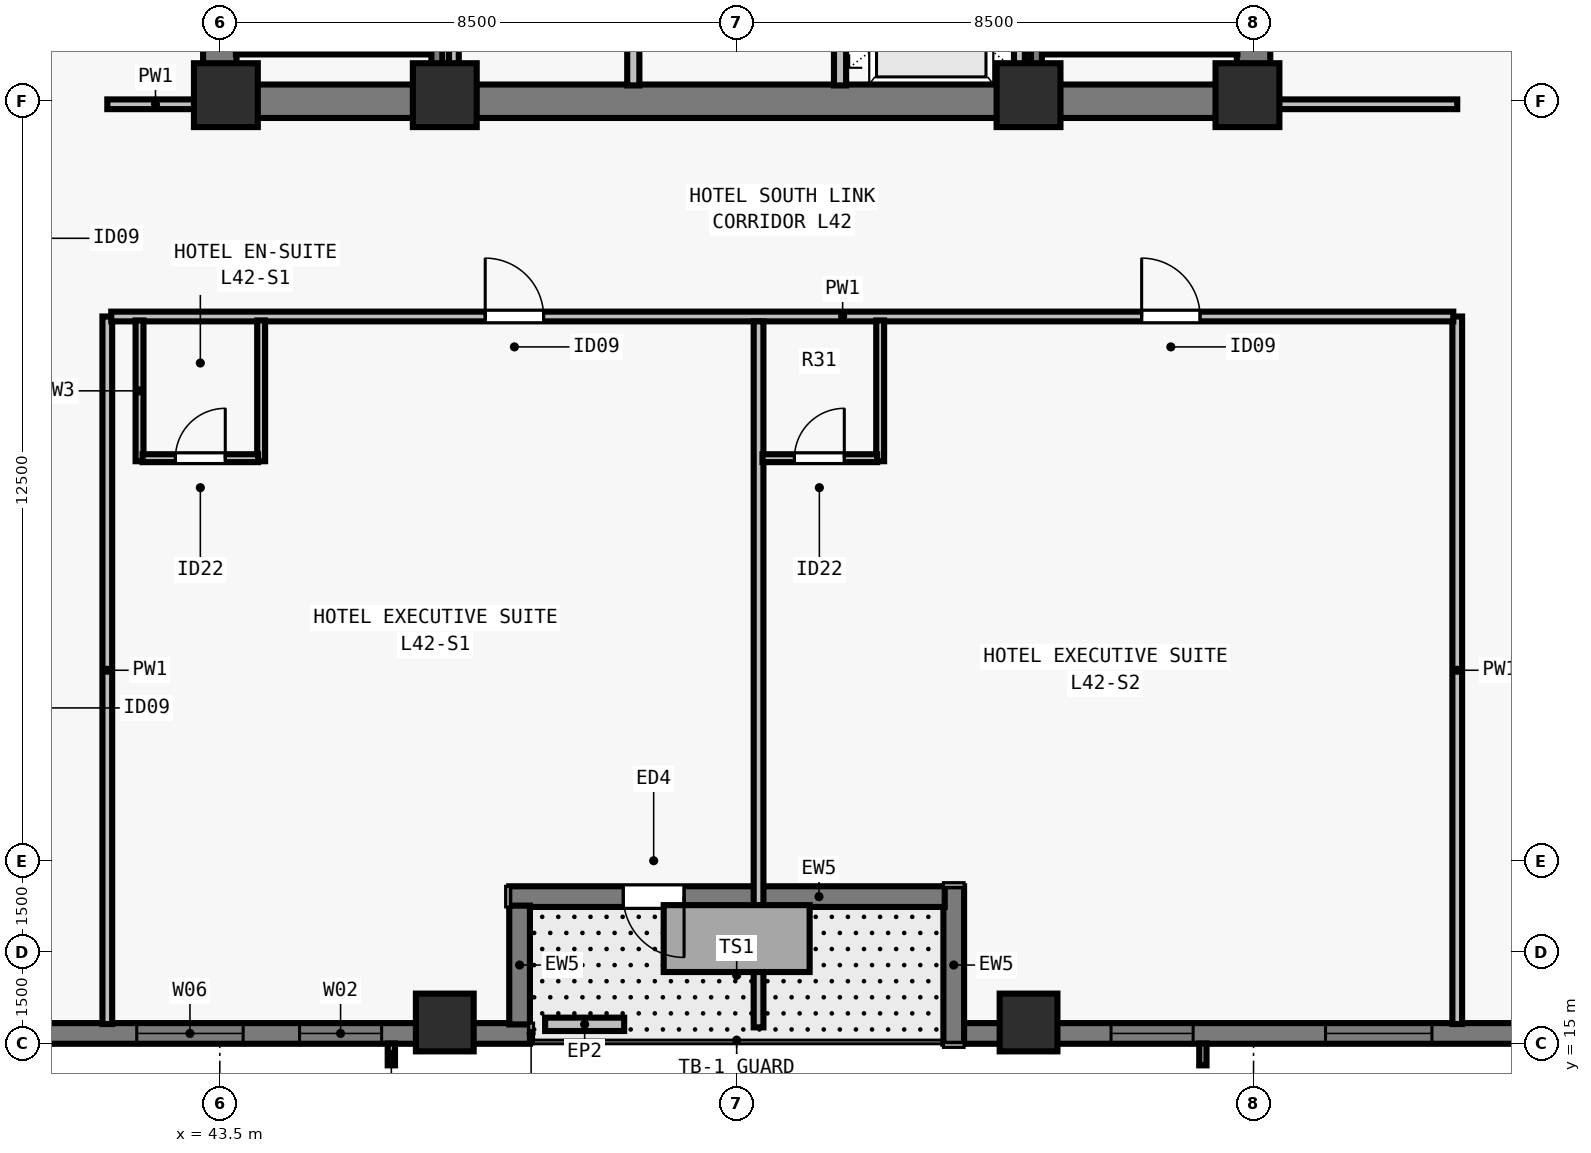
"""IFC4 building model, lengths in metres.
Left out: names, types, materials, properties, quantities, classifications, styles, units other than length and angle.
Written with IfcOpenShell. Run it as: python <this file> out.ifc"""

import sys

from ifc_helpers import new_model, si_unit, direction, frame, frame_2d, origin, origin_2d, place, context, subcontext, project, spatial, rectangle, extrude, element, fill, save


model = new_model("IFC4")
c1 = context("Model", 3, precision=1e-05, world=origin(), true_north=direction((0.0, 1.0)))
c2 = subcontext(c1, "Body", "Model", "MODEL_VIEW")
j1 = project(units=[si_unit("LENGTHUNIT", "METRE"), si_unit("PLANEANGLEUNIT", "RADIAN")], contexts=[c1])
p1 = place(None, origin())
s1 = spatial("IfcSite", under=j1, at=p1, CompositionType="ELEMENT")
p2 = place(p1, origin())
s2 = spatial("IfcBuilding", under=s1, at=p2, CompositionType="ELEMENT")
p3 = place(p2, frame((0.0, 0.0, 155.0)))
s3 = spatial("IfcBuildingStorey", under=s2, at=p3, CompositionType="ELEMENT", Elevation=155.0)
for number, where, z_axis, x_axis in (
    (1, (43.6, 30.6, 0.0), (0.0, 0.0, 1.0), (1.0, 0.0, 0.0)),
    (2, (47.2, 30.6, 0.0), (0.0, 0.0, 1.0), (1.0, 0.0, 0.0)),
    (3, (56.8, 30.6, 0.0), (0.0, 0.0, 1.0), (1.0, 0.0, 0.0)),
    (4, (60.4, 30.6, 0.0), (0.0, 0.0, 1.0), (1.0, 0.0, 0.0)),
):
    element("IfcColumn", number, at=place(p3, frame(where, z_axis=z_axis, x_axis=x_axis)), inside=s3, PredefinedType="COLUMN", context=c2, shape_type="SweptSolid", body=[
        extrude(rectangle(XDim=1.05, YDim=1.05, at=origin_2d()), origin(), (0.0, 0.0, 1.0), 3.5),
    ])
for number, where, z_axis, x_axis in (
    (5, (47.2, 15.35, 0.0), (0.0, 0.0, 1.0), (1.0, 0.0, 0.0)),
    (6, (56.8, 15.35, 0.0), (0.0, 0.0, 1.0), (1.0, 0.0, 0.0)),
):
    element("IfcColumn", number, at=place(p3, frame(where, z_axis=z_axis, x_axis=x_axis)), inside=s3, PredefinedType="COLUMN", context=c2, shape_type="SweptSolid", body=[
        extrude(rectangle(XDim=0.95, YDim=0.95, at=origin_2d()), origin(), (0.0, 0.0, 1.0), 3.5),
    ])
p4 = place(p3, frame((48.6, 15.17, 0.0), z_axis=(0.0, 0.0, 1.0), x_axis=(-1.0, 0.0, 0.0)))
e7 = element("IfcWall", 7, at=p4, inside=s3, PredefinedType="SOLIDWALL", context=c2, shape_type="SweptSolid", body=[
    extrude(rectangle(XDim=16.282, YDim=0.34, at=frame_2d((8.141, 0.0))), origin(), (0.0, 0.0, 1.0), 3.28),
])
p5 = place(p4, frame((2.439, 0.0, 0.8)))
e8 = element("IfcOpeningElement", 8, at=p5, cuts=e7, PredefinedType="OPENING", context=c2, shape_type="SweptSolid", body=[
    extrude(rectangle(XDim=1.35, YDim=1.66, at=frame_2d((0.675, 0.83))), frame((0.0, 0.18, 0.0), z_axis=(0.0, -1.0, 0.0), x_axis=(1.0, 0.0, 0.0)), (0.0, 0.0, 1.0), 0.36),
])
p6 = place(p4, frame((4.716, 0.0, 0.8)))
e9 = element("IfcOpeningElement", 9, at=p6, cuts=e7, PredefinedType="OPENING", context=c2, shape_type="SweptSolid", body=[
    extrude(rectangle(XDim=1.75, YDim=1.66, at=frame_2d((0.875, 0.83))), frame((0.0, 0.18, 0.0), z_axis=(0.0, -1.0, 0.0), x_axis=(1.0, 0.0, 0.0)), (0.0, 0.0, 1.0), 0.36),
])
p7 = place(p4, frame((9.443, 0.0, 0.8)))
e10 = element("IfcOpeningElement", 10, at=p7, cuts=e7, PredefinedType="OPENING", context=c2, shape_type="SweptSolid", body=[
    extrude(rectangle(XDim=1.35, YDim=1.66, at=frame_2d((0.675, 0.83))), frame((0.0, 0.18, 0.0), z_axis=(0.0, -1.0, 0.0), x_axis=(1.0, 0.0, 0.0)), (0.0, 0.0, 1.0), 0.36),
])
p8 = place(p3, frame((72.0, 15.17, 0.0), z_axis=(0.0, 0.0, 1.0), x_axis=(-1.0, 0.0, 0.0)))
e11 = element("IfcWall", 11, at=p8, inside=s3, PredefinedType="SOLIDWALL", context=c2, shape_type="SweptSolid", body=[
    extrude(rectangle(XDim=16.282, YDim=0.34, at=frame_2d((8.141, 0.0))), origin(), (0.0, 0.0, 1.0), 3.28),
])
p9 = place(p8, frame((4.189, 0.0, 0.8)))
e12 = element("IfcOpeningElement", 12, at=p9, cuts=e11, PredefinedType="OPENING", context=c2, shape_type="SweptSolid", body=[
    extrude(rectangle(XDim=1.35, YDim=1.66, at=frame_2d((0.675, 0.83))), frame((0.0, 0.18, 0.0), z_axis=(0.0, -1.0, 0.0), x_axis=(1.0, 0.0, 0.0)), (0.0, 0.0, 1.0), 0.36),
])
p10 = place(p8, frame((8.566, 0.0, 0.8)))
e13 = element("IfcOpeningElement", 13, at=p10, cuts=e11, PredefinedType="OPENING", context=c2, shape_type="SweptSolid", body=[
    extrude(rectangle(XDim=1.75, YDim=1.66, at=frame_2d((0.875, 0.83))), frame((0.0, 0.18, 0.0), z_axis=(0.0, -1.0, 0.0), x_axis=(1.0, 0.0, 0.0)), (0.0, 0.0, 1.0), 0.36),
])
p11 = place(p8, frame((12.493, 0.0, 0.8)))
e14 = element("IfcOpeningElement", 14, at=p11, cuts=e11, PredefinedType="OPENING", context=c2, shape_type="SweptSolid", body=[
    extrude(rectangle(XDim=1.35, YDim=1.66, at=frame_2d((0.675, 0.83))), frame((0.0, 0.18, 0.0), z_axis=(0.0, -1.0, 0.0), x_axis=(1.0, 0.0, 0.0)), (0.0, 0.0, 1.0), 0.36),
])
p12 = place(p3, frame((55.57, 15.0, 0.0), z_axis=(0.0, 0.0, 1.0), x_axis=(0.0, 1.0, 0.0)))
e15 = element("IfcWall", 15, at=p12, inside=s3, PredefinedType="SOLIDWALL", context=c2, shape_type="SweptSolid", body=[
    extrude(rectangle(XDim=2.59, YDim=0.34, at=frame_2d((1.295, 0.0))), origin(), (0.0, 0.0, 1.0), 3.28),
])
p13 = place(p3, frame((55.422, 17.42, 0.0), z_axis=(0.0, 0.0, 1.0), x_axis=(-1.0, 0.0, 0.0)))
e16 = element("IfcWall", 16, at=p13, inside=s3, PredefinedType="SOLIDWALL", context=c2, shape_type="SweptSolid", body=[
    extrude(rectangle(XDim=7.162, YDim=0.34, at=frame_2d((3.581, 0.0))), origin(), (0.0, 0.0, 1.0), 3.28),
])
p14 = place(p13, frame((4.287, 0.0, 0.0)))
e17 = element("IfcOpeningElement", 17, at=p14, cuts=e16, PredefinedType="OPENING", context=c2, shape_type="SweptSolid", body=[
    extrude(rectangle(XDim=1.0, YDim=2.15, at=frame_2d((0.5, 1.075))), frame((0.0, 0.18, 0.0), z_axis=(0.0, -1.0, 0.0), x_axis=(1.0, 0.0, 0.0)), (0.0, 0.0, 1.0), 0.36),
])
p15 = place(p3, frame((48.43, 17.272, 0.0), z_axis=(0.0, 0.0, 1.0), x_axis=(0.0, -1.0, 0.0)))
e18 = element("IfcWall", 18, at=p15, inside=s3, PredefinedType="SOLIDWALL", context=c2, shape_type="SweptSolid", body=[
    extrude(rectangle(XDim=1.954, YDim=0.34, at=frame_2d((0.977, 0.0))), origin(), (0.0, 0.0, 1.0), 3.28),
])
p16 = place(p3, frame((48.85, 15.32, 0.0), z_axis=(0.0, 0.0, 1.0), x_axis=(1.0, 0.0, 0.0)))
e19 = element("IfcWall", 19, at=p16, inside=s3, PredefinedType="PARAPET", context=c2, shape_type="SweptSolid", body=[
    extrude(rectangle(XDim=1.3, YDim=0.22, at=frame_2d((0.65, 0.0))), origin(), (0.0, 0.0, 1.0), 0.55),
])
p17 = place(p3, frame((43.225, 30.5, 0.0), z_axis=(0.0, 0.0, 1.0), x_axis=(1.0, 0.0, 0.0)))
e20 = element("IfcWall", 20, at=p17, inside=s3, PredefinedType="SHEAR", context=c2, shape_type="SweptSolid", body=[
    extrude(rectangle(XDim=17.55, YDim=0.55, at=frame_2d((8.775, 0.0))), origin(), (0.0, 0.0, 1.0), 3.28),
])
for number, where, z_axis, x_axis in (
    (21, (43.5, 30.765, 0.0), (0.0, 0.0, 1.0), (0.0, 1.0, 0.0)),
    (22, (60.5, 30.765, 0.0), (0.0, 0.0, 1.0), (0.0, 1.0, 0.0)),
):
    element("IfcWall", number, at=place(p3, frame(where, z_axis=z_axis, x_axis=x_axis)), inside=s3, PredefinedType="SHEAR", context=c2, shape_type="SweptSolid", body=[
        extrude(rectangle(XDim=7.985, YDim=0.55, at=frame_2d((3.993, 0.0))), origin(), (0.0, 0.0, 1.0), 3.28),
    ])
p18 = place(p3, frame((50.3, 30.76, 0.0), z_axis=(0.0, 0.0, 1.0), x_axis=(0.0, 1.0, 0.0)))
e23 = element("IfcWall", 23, at=p18, inside=s3, PredefinedType="SOLIDWALL", context=c2, shape_type="SweptSolid", body=[
    extrude(rectangle(XDim=7.855, YDim=0.2, at=frame_2d((3.927, 0.0))), origin(), (0.0, 0.0, 1.0), 3.28),
])
p19 = place(p18, frame((3.29, 0.0, 0.0)))
e24 = element("IfcOpeningElement", 24, at=p19, cuts=e23, PredefinedType="OPENING", context=c2, shape_type="SweptSolid", body=[
    extrude(rectangle(XDim=0.9, YDim=2.12, at=frame_2d((0.45, 1.06))), frame((0.0, 0.11, 0.0), z_axis=(0.0, -1.0, 0.0), x_axis=(1.0, 0.0, 0.0)), (0.0, 0.0, 1.0), 0.22),
])
p20 = place(p3, frame((53.7, 30.76, 0.0), z_axis=(0.0, 0.0, 1.0), x_axis=(0.0, 1.0, 0.0)))
e25 = element("IfcWall", 25, at=p20, inside=s3, PredefinedType="SOLIDWALL", context=c2, shape_type="SweptSolid", body=[
    extrude(rectangle(XDim=7.855, YDim=0.2, at=frame_2d((3.927, 0.0))), origin(), (0.0, 0.0, 1.0), 3.28),
])
p21 = place(p20, frame((0.79, 0.0, 0.0)))
e26 = element("IfcOpeningElement", 26, at=p21, cuts=e25, PredefinedType="OPENING", context=c2, shape_type="SweptSolid", body=[
    extrude(rectangle(XDim=1.1, YDim=2.2, at=frame_2d((0.55, 1.1))), frame((0.0, 0.11, 0.0), z_axis=(0.0, -1.0, 0.0), x_axis=(1.0, 0.0, 0.0)), (0.0, 0.0, 1.0), 0.22),
])
p22 = place(p20, frame((3.49, 0.0, 0.0)))
e27 = element("IfcOpeningElement", 27, at=p22, cuts=e25, PredefinedType="OPENING", context=c2, shape_type="SweptSolid", body=[
    extrude(rectangle(XDim=1.1, YDim=2.2, at=frame_2d((0.55, 1.1))), frame((0.0, 0.11, 0.0), z_axis=(0.0, -1.0, 0.0), x_axis=(1.0, 0.0, 0.0)), (0.0, 0.0, 1.0), 0.22),
])
p23 = place(p20, frame((6.19, 0.0, 0.0)))
e28 = element("IfcOpeningElement", 28, at=p23, cuts=e25, PredefinedType="OPENING", context=c2, shape_type="SweptSolid", body=[
    extrude(rectangle(XDim=1.1, YDim=2.2, at=frame_2d((0.55, 1.1))), frame((0.0, 0.11, 0.0), z_axis=(0.0, -1.0, 0.0), x_axis=(1.0, 0.0, 0.0)), (0.0, 0.0, 1.0), 0.22),
])
p24 = place(p3, frame((47.35, 30.76, 0.0), z_axis=(0.0, 0.0, 1.0), x_axis=(0.0, 1.0, 0.0)))
e29 = element("IfcWall", 29, at=p24, inside=s3, PredefinedType="PARTITIONING", context=c2, shape_type="SweptSolid", body=[
    extrude(rectangle(XDim=7.855, YDim=0.16, at=frame_2d((3.927, 0.0))), origin(), (0.0, 0.0, 1.0), 3.28),
])
p25 = place(p3, frame((56.65, 30.76, 0.0), z_axis=(0.0, 0.0, 1.0), x_axis=(0.0, 1.0, 0.0)))
e30 = element("IfcWall", 30, at=p25, inside=s3, PredefinedType="SOLIDWALL", context=c2, shape_type="SweptSolid", body=[
    extrude(rectangle(XDim=7.855, YDim=0.18, at=frame_2d((3.927, 0.0))), origin(), (0.0, 0.0, 1.0), 3.28),
])
p26 = place(p3, frame((41.65, 15.325, 0.0), z_axis=(0.0, 0.0, 1.0), x_axis=(0.0, 1.0, 0.0)))
e31 = element("IfcWall", 31, at=p26, inside=s3, PredefinedType="PARTITIONING", context=c2, shape_type="SweptSolid", body=[
    extrude(rectangle(XDim=11.635, YDim=0.16, at=frame_2d((5.817, 0.0))), origin(), (0.0, 0.0, 1.0), 3.28),
])
p27 = place(p3, frame((41.65, 30.45, 0.0), z_axis=(0.0, 0.0, 1.0), x_axis=(1.0, 0.0, 0.0)))
e32 = element("IfcWall", 32, at=p27, inside=s3, PredefinedType="PARTITIONING", context=c2, shape_type="SweptSolid", body=[
    extrude(rectangle(XDim=1.585, YDim=0.16, at=frame_2d((0.792, 0.0))), origin(), (0.0, 0.0, 1.0), 3.28),
])
p28 = place(p3, frame((63.85, 15.325, 0.0), z_axis=(0.0, 0.0, 1.0), x_axis=(0.0, 1.0, 0.0)))
e33 = element("IfcWall", 33, at=p28, inside=s3, PredefinedType="PARTITIONING", context=c2, shape_type="SweptSolid", body=[
    extrude(rectangle(XDim=11.635, YDim=0.16, at=frame_2d((5.817, 0.0))), origin(), (0.0, 0.0, 1.0), 2.555),
])
p29 = place(p3, frame((60.765, 30.45, 0.0), z_axis=(0.0, 0.0, 1.0), x_axis=(1.0, 0.0, 0.0)))
e34 = element("IfcWall", 34, at=p29, inside=s3, PredefinedType="PARTITIONING", context=c2, shape_type="SweptSolid", body=[
    extrude(rectangle(XDim=3.085, YDim=0.16, at=frame_2d((1.542, 0.0))), origin(), (0.0, 0.0, 1.0), 3.28),
])
p30 = place(p3, frame((41.715, 26.96, 0.0), z_axis=(0.0, 0.0, 1.0), x_axis=(1.0, 0.0, 0.0)))
e35 = element("IfcWall", 35, at=p30, inside=s3, PredefinedType="PARTITIONING", context=c2, shape_type="SweptSolid", body=[
    extrude(rectangle(XDim=22.07, YDim=0.16, at=frame_2d((11.035, 0.0))), origin(), (0.0, 0.0, 1.0), 3.28),
])
p31 = place(p30, frame((6.15, 0.0, 0.0)))
e36 = element("IfcOpeningElement", 36, at=p31, cuts=e35, PredefinedType="OPENING", context=c2, shape_type="SweptSolid", body=[
    extrude(rectangle(XDim=0.96, YDim=2.15, at=frame_2d((0.48, 1.075))), frame((0.0, 0.09, 0.0), z_axis=(0.0, -1.0, 0.0), x_axis=(1.0, 0.0, 0.0)), (0.0, 0.0, 1.0), 0.18),
])
p32 = place(p30, frame((16.945, 0.0, 0.0)))
e37 = element("IfcOpeningElement", 37, at=p32, cuts=e35, PredefinedType="OPENING", context=c2, shape_type="SweptSolid", body=[
    extrude(rectangle(XDim=0.96, YDim=2.15, at=frame_2d((0.48, 1.075))), frame((0.0, 0.09, 0.0), z_axis=(0.0, -1.0, 0.0), x_axis=(1.0, 0.0, 0.0)), (0.0, 0.0, 1.0), 0.18),
])
for number, where, z_axis, x_axis in (
    (38, (42.18, 24.58, 0.0), (0.0, 0.0, 1.0), (0.0, 1.0, 0.0)),
    (39, (44.18, 24.58, 0.0), (0.0, 0.0, 1.0), (0.0, 1.0, 0.0)),
):
    element("IfcWall", number, at=place(p3, frame(where, z_axis=z_axis, x_axis=x_axis)), inside=s3, PredefinedType="PLUMBINGWALL", context=c2, shape_type="SweptSolid", body=[
        extrude(rectangle(XDim=2.315, YDim=0.13, at=frame_2d((1.157, 0.0))), origin(), (0.0, 0.0, 1.0), 3.28),
    ])
p33 = place(p3, frame((42.23, 24.63, 0.0), z_axis=(0.0, 0.0, 1.0), x_axis=(1.0, 0.0, 0.0)))
e40 = element("IfcWall", 40, at=p33, inside=s3, PredefinedType="PLUMBINGWALL", context=c2, shape_type="SweptSolid", body=[
    extrude(rectangle(XDim=1.9, YDim=0.13, at=frame_2d((0.95, 0.0))), origin(), (0.0, 0.0, 1.0), 3.28),
])
p34 = place(p33, frame((0.54, 0.0, 0.0)))
e41 = element("IfcOpeningElement", 41, at=p34, cuts=e40, PredefinedType="OPENING", context=c2, shape_type="SweptSolid", body=[
    extrude(rectangle(XDim=0.82, YDim=2.1, at=frame_2d((0.41, 1.05))), frame((0.0, 0.075, 0.0), z_axis=(0.0, -1.0, 0.0), x_axis=(1.0, 0.0, 0.0)), (0.0, 0.0, 1.0), 0.15),
])
p35 = place(p3, frame((52.36, 15.27, 0.0), z_axis=(0.0, 0.0, 1.0), x_axis=(0.0, 1.0, 0.0)))
e42 = element("IfcWall", 42, at=p35, inside=s3, PredefinedType="PARTITIONING", context=c2, shape_type="SweptSolid", body=[
    extrude(rectangle(XDim=11.61, YDim=0.16, at=frame_2d((5.805, 0.0))), origin(), (0.0, 0.0, 1.0), 2.896),
])
p36 = place(p3, frame((54.36, 24.58, 0.0), z_axis=(0.0, 0.0, 1.0), x_axis=(0.0, 1.0, 0.0)))
e43 = element("IfcWall", 43, at=p36, inside=s3, PredefinedType="PLUMBINGWALL", context=c2, shape_type="SweptSolid", body=[
    extrude(rectangle(XDim=2.315, YDim=0.13, at=frame_2d((1.157, 0.0))), origin(), (0.0, 0.0, 1.0), 2.896),
])
p37 = place(p3, frame((52.425, 24.63, 0.0), z_axis=(0.0, 0.0, 1.0), x_axis=(1.0, 0.0, 0.0)))
e44 = element("IfcWall", 44, at=p37, inside=s3, PredefinedType="PLUMBINGWALL", context=c2, shape_type="SweptSolid", body=[
    extrude(rectangle(XDim=1.885, YDim=0.13, at=frame_2d((0.942, 0.0))), origin(), (0.0, 0.0, 1.0), 3.28),
])
p38 = place(p37, frame((0.525, 0.0, 0.0)))
e45 = element("IfcOpeningElement", 45, at=p38, cuts=e44, PredefinedType="OPENING", context=c2, shape_type="SweptSolid", body=[
    extrude(rectangle(XDim=0.82, YDim=2.1, at=frame_2d((0.41, 1.05))), frame((0.0, 0.075, 0.0), z_axis=(0.0, -1.0, 0.0), x_axis=(1.0, 0.0, 0.0)), (0.0, 0.0, 1.0), 0.15),
])
p39 = place(p3, frame((43.765, 31.36, 0.0), z_axis=(0.0, 0.0, 1.0), x_axis=(1.0, 0.0, 0.0)))
e46 = element("IfcWall", 46, at=p39, inside=s3, PredefinedType="SOLIDWALL", context=c2, shape_type="SweptSolid", body=[
    extrude(rectangle(XDim=3.23, YDim=0.18, at=frame_2d((1.615, 0.0))), origin(), (0.0, 0.0, 1.0), 3.28),
])
p40 = place(p3, frame((47.07, 38.78, 0.0), z_axis=(0.0, 0.0, 1.0), x_axis=(0.0, -1.0, 0.0)))
e47 = element("IfcWall", 47, at=p40, inside=s3, PredefinedType="SOLIDWALL", context=c2, shape_type="SweptSolid", body=[
    extrude(rectangle(XDim=8.017, YDim=0.18, at=frame_2d((4.009, 0.0))), origin(), (0.0, 0.0, 1.0), 3.28),
])
p41 = place(p3, frame((57.005, 31.36, 0.0), z_axis=(0.0, 0.0, 1.0), x_axis=(1.0, 0.0, 0.0)))
e48 = element("IfcWall", 48, at=p41, inside=s3, PredefinedType="SOLIDWALL", context=c2, shape_type="SweptSolid", body=[
    extrude(rectangle(XDim=3.23, YDim=0.18, at=frame_2d((1.615, 0.0))), origin(), (0.0, 0.0, 1.0), 3.28),
])
p42 = place(p3, frame((56.93, 38.78, 0.0), z_axis=(0.0, 0.0, 1.0), x_axis=(0.0, -1.0, 0.0)))
e49 = element("IfcWall", 49, at=p42, inside=s3, PredefinedType="SOLIDWALL", context=c2, shape_type="SweptSolid", body=[
    extrude(rectangle(XDim=8.017, YDim=0.18, at=frame_2d((4.009, 0.0))), origin(), (0.0, 0.0, 1.0), 3.28),
])
p43 = place(p5, origin())
e50 = element("IfcWindow", 50, at=p43, inside=s3, PartitioningType="SINGLE_PANEL", PredefinedType="WINDOW", context=c2, shape_type="SweptSolid", body=[
    extrude(rectangle(XDim=1.35, YDim=1.66, at=frame_2d((0.675, 0.83))), frame((0.0, -0.05, 0.0), z_axis=(0.0, -1.0, 0.0), x_axis=(1.0, 0.0, 0.0)), (0.0, 0.0, 1.0), 0.06),
])
fill(e8, e50)
p44 = place(p6, origin())
e51 = element("IfcWindow", 51, at=p44, inside=s3, PartitioningType="SINGLE_PANEL", PredefinedType="WINDOW", context=c2, shape_type="SweptSolid", body=[
    extrude(rectangle(XDim=1.75, YDim=1.66, at=frame_2d((0.875, 0.83))), frame((0.0, -0.05, 0.0), z_axis=(0.0, -1.0, 0.0), x_axis=(1.0, 0.0, 0.0)), (0.0, 0.0, 1.0), 0.06),
])
fill(e9, e51)
p45 = place(p10, origin())
e52 = element("IfcWindow", 52, at=p45, inside=s3, PartitioningType="SINGLE_PANEL", PredefinedType="WINDOW", context=c2, shape_type="SweptSolid", body=[
    extrude(rectangle(XDim=1.75, YDim=1.66, at=frame_2d((0.875, 0.83))), frame((0.0, -0.05, 0.0), z_axis=(0.0, -1.0, 0.0), x_axis=(1.0, 0.0, 0.0)), (0.0, 0.0, 1.0), 0.06),
])
fill(e13, e52)
p46 = place(p11, origin())
e53 = element("IfcWindow", 53, at=p46, inside=s3, PartitioningType="SINGLE_PANEL", PredefinedType="WINDOW", context=c2, shape_type="SweptSolid", body=[
    extrude(rectangle(XDim=1.35, YDim=1.66, at=frame_2d((0.675, 0.83))), frame((0.0, -0.05, 0.0), z_axis=(0.0, -1.0, 0.0), x_axis=(1.0, 0.0, 0.0)), (0.0, 0.0, 1.0), 0.06),
])
fill(e14, e53)
p47 = place(p14, origin())
e54 = element("IfcDoor", 54, at=p47, inside=s3, OperationType="SINGLE_SWING_LEFT", PredefinedType="DOOR", context=c2, shape_type="SweptSolid", body=[
    extrude(rectangle(XDim=1.0, YDim=2.15, at=frame_2d((0.5, 1.075))), frame((0.0, 0.025, 0.0), z_axis=(0.0, -1.0, 0.0), x_axis=(1.0, 0.0, 0.0)), (0.0, 0.0, 1.0), 0.05),
])
fill(e17, e54)
p48 = place(p34, origin())
e55 = element("IfcDoor", 55, at=p48, inside=s3, OperationType="SINGLE_SWING_RIGHT", PredefinedType="DOOR", context=c2, shape_type="SweptSolid", body=[
    extrude(rectangle(XDim=0.82, YDim=2.1, at=frame_2d((0.41, 1.05))), frame((0.0, 0.025, 0.0), z_axis=(0.0, -1.0, 0.0), x_axis=(1.0, 0.0, 0.0)), (0.0, 0.0, 1.0), 0.05),
])
fill(e41, e55)
p49 = place(p31, origin())
e56 = element("IfcDoor", 56, at=p49, inside=s3, OperationType="SINGLE_SWING_LEFT", PredefinedType="DOOR", context=c2, shape_type="SweptSolid", body=[
    extrude(rectangle(XDim=0.96, YDim=2.15, at=frame_2d((0.48, 1.075))), frame((0.0, 0.025, 0.0), z_axis=(0.0, -1.0, 0.0), x_axis=(1.0, 0.0, 0.0)), (0.0, 0.0, 1.0), 0.05),
])
fill(e36, e56)
p50 = place(p38, origin())
e57 = element("IfcDoor", 57, at=p50, inside=s3, OperationType="SINGLE_SWING_RIGHT", PredefinedType="DOOR", context=c2, shape_type="SweptSolid", body=[
    extrude(rectangle(XDim=0.82, YDim=2.1, at=frame_2d((0.41, 1.05))), frame((0.0, 0.025, 0.0), z_axis=(0.0, -1.0, 0.0), x_axis=(1.0, 0.0, 0.0)), (0.0, 0.0, 1.0), 0.05),
])
fill(e45, e57)
p51 = place(p32, origin())
e58 = element("IfcDoor", 58, at=p51, inside=s3, OperationType="SINGLE_SWING_LEFT", PredefinedType="DOOR", context=c2, shape_type="SweptSolid", body=[
    extrude(rectangle(XDim=0.96, YDim=2.15, at=frame_2d((0.48, 1.075))), frame((0.0, 0.025, 0.0), z_axis=(0.0, -1.0, 0.0), x_axis=(1.0, 0.0, 0.0)), (0.0, 0.0, 1.0), 0.05),
])
fill(e37, e58)
save(model, sys.argv[1])
